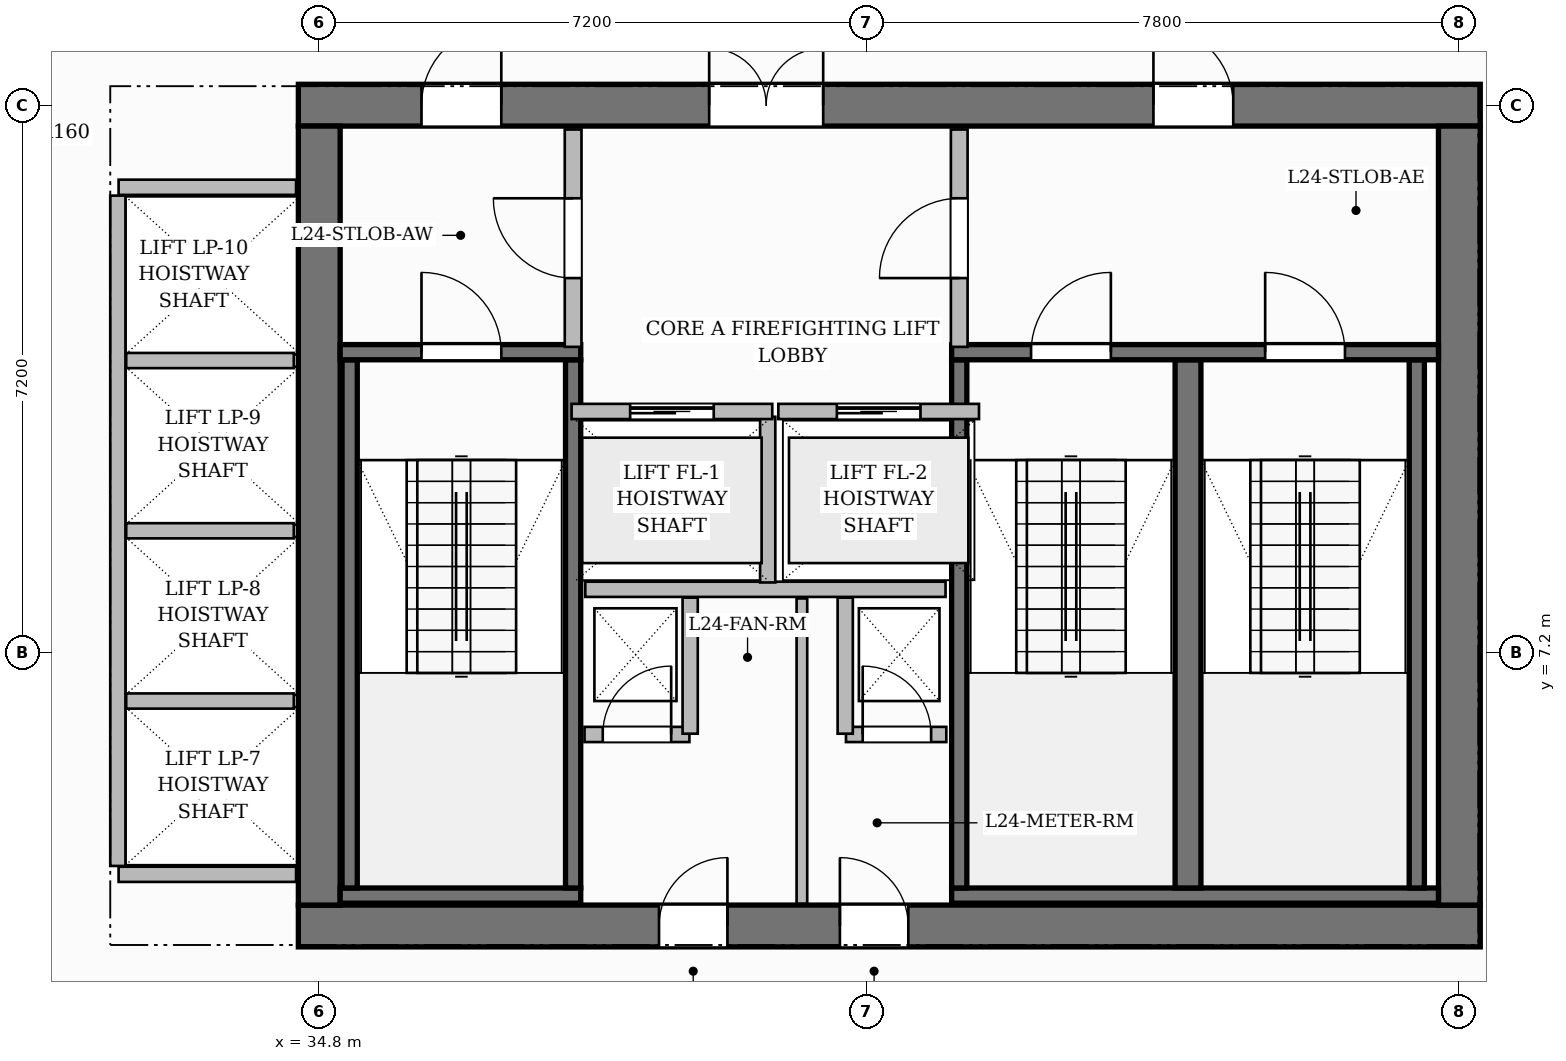
"""IFC4 building model, lengths in metres.
Left out: names, types, materials, properties, quantities, classifications, styles, units other than length and angle.
Written with IfcOpenShell. Run it as: python <this file> out.ifc"""

import sys

from ifc_helpers import new_model, si_unit, direction, frame, frame_2d, origin, place, context, subcontext, project, spatial, rectangle, extrude, source, transform, mapped, element, fill, save


model = new_model("IFC4")
c1 = context("Model", 3, precision=1e-05, world=origin(), true_north=direction((0.0, 1.0)))
c2 = subcontext(c1, "Body", "Model", "MODEL_VIEW")
j1 = project(units=[si_unit("LENGTHUNIT", "METRE"), si_unit("PLANEANGLEUNIT", "RADIAN")], contexts=[c1])
p1 = place(None, origin())
s1 = spatial("IfcSite", under=j1, at=p1, CompositionType="ELEMENT")
p2 = place(p1, origin())
s2 = spatial("IfcBuilding", under=s1, at=p2, CompositionType="ELEMENT")
p3 = place(p2, frame((0.0, 0.0, 99.0)))
s3 = spatial("IfcBuildingStorey", under=s2, at=p3, CompositionType="ELEMENT", Elevation=99.0)
p4 = place(p3, frame((34.525, 3.6, 0.0), z_axis=(0.0, 0.0, 1.0), x_axis=(1.0, 0.0, 0.0)))
e1 = element("IfcWall", 1, at=p4, inside=s3, PredefinedType="SHEAR", context=c2, shape_type="SweptSolid", body=[
    extrude(rectangle(XDim=15.55, YDim=0.55, at=frame_2d((7.775, 0.0))), origin(), (0.0, 0.0, 1.0), 3.7),
])
p5 = place(p4, frame((4.745, 0.0, 0.0)))
e2 = element("IfcOpeningElement", 2, at=p5, cuts=e1, PredefinedType="OPENING", context=c2, shape_type="SweptSolid", body=[
    extrude(rectangle(XDim=0.9, YDim=2.1, at=frame_2d((0.45, 1.05))), frame((0.0, 0.285, 0.0), z_axis=(0.0, -1.0, 0.0), x_axis=(1.0, 0.0, 0.0)), (0.0, 0.0, 1.0), 0.57),
])
p6 = place(p4, frame((7.125, 0.0, 0.0)))
e3 = element("IfcOpeningElement", 3, at=p6, cuts=e1, PredefinedType="OPENING", context=c2, shape_type="SweptSolid", body=[
    extrude(rectangle(XDim=0.9, YDim=2.1, at=frame_2d((0.45, 1.05))), frame((0.0, 0.285, 0.0), z_axis=(0.0, -1.0, 0.0), x_axis=(1.0, 0.0, 0.0)), (0.0, 0.0, 1.0), 0.57),
])
p7 = place(p3, frame((34.525, 14.4, 0.0), z_axis=(0.0, 0.0, 1.0), x_axis=(1.0, 0.0, 0.0)))
e4 = element("IfcWall", 4, at=p7, inside=s3, PredefinedType="SHEAR", context=c2, shape_type="SweptSolid", body=[
    extrude(rectangle(XDim=15.55, YDim=0.55, at=frame_2d((7.775, 0.0))), origin(), (0.0, 0.0, 1.0), 3.7),
])
p8 = place(p7, frame((5.405, 0.0, 0.0)))
e5 = element("IfcOpeningElement", 5, at=p8, cuts=e4, PredefinedType="OPENING", context=c2, shape_type="SweptSolid", body=[
    extrude(rectangle(XDim=1.5, YDim=2.2, at=frame_2d((0.75, 1.1))), frame((0.0, 0.285, 0.0), z_axis=(0.0, -1.0, 0.0), x_axis=(1.0, 0.0, 0.0)), (0.0, 0.0, 1.0), 0.57),
])
p9 = place(p7, frame((1.62, 0.0, 0.0)))
e6 = element("IfcOpeningElement", 6, at=p9, cuts=e4, PredefinedType="OPENING", context=c2, shape_type="SweptSolid", body=[
    extrude(rectangle(XDim=1.05, YDim=2.15, at=frame_2d((0.525, 1.075))), frame((0.0, 0.285, 0.0), z_axis=(0.0, -1.0, 0.0), x_axis=(1.0, 0.0, 0.0)), (0.0, 0.0, 1.0), 0.57),
])
p10 = place(p7, frame((11.25, 0.0, 0.0)))
e7 = element("IfcOpeningElement", 7, at=p10, cuts=e4, PredefinedType="OPENING", context=c2, shape_type="SweptSolid", body=[
    extrude(rectangle(XDim=1.05, YDim=2.15, at=frame_2d((0.525, 1.075))), frame((0.0, 0.285, 0.0), z_axis=(0.0, -1.0, 0.0), x_axis=(1.0, 0.0, 0.0)), (0.0, 0.0, 1.0), 0.57),
])
for number, where, z_axis, x_axis in (
    (8, (34.8, 3.875, 0.0), (0.0, 0.0, 1.0), (0.0, 1.0, 0.0)),
    (9, (49.8, 3.875, 0.0), (0.0, 0.0, 1.0), (0.0, 1.0, 0.0)),
):
    element("IfcWall", number, at=place(p3, frame(where, z_axis=z_axis, x_axis=x_axis)), inside=s3, PredefinedType="SHEAR", context=c2, shape_type="SweptSolid", body=[
        extrude(rectangle(XDim=10.25, YDim=0.55, at=frame_2d((5.125, 0.0))), origin(), (0.0, 0.0, 1.0), 3.7),
    ])
p11 = place(p3, frame((35.075, 4.0, 0.0), z_axis=(0.0, 0.0, 1.0), x_axis=(1.0, 0.0, 0.0)))
e10 = element("IfcWall", 10, at=p11, inside=s3, PredefinedType="SHEAR", context=c2, shape_type="SweptSolid", body=[
    extrude(rectangle(XDim=3.165, YDim=0.2, at=frame_2d((1.583, 0.0))), origin(), (0.0, 0.0, 1.0), 3.7),
])
for number, where, z_axis, x_axis in (
    (11, (35.2, 4.1, 0.0), (0.0, 0.0, 1.0), (0.0, 1.0, 0.0)),
    (12, (38.14, 4.1, 0.0), (0.0, 0.0, 1.0), (0.0, 1.0, 0.0)),
):
    element("IfcWall", number, at=place(p3, frame(where, z_axis=z_axis, x_axis=x_axis)), inside=s3, PredefinedType="SHEAR", context=c2, shape_type="SweptSolid", body=[
        extrude(rectangle(XDim=6.95, YDim=0.2, at=frame_2d((3.475, 0.0))), origin(), (0.0, 0.0, 1.0), 3.7),
    ])
p12 = place(p3, frame((35.075, 11.15, 0.0), z_axis=(0.0, 0.0, 1.0), x_axis=(1.0, 0.0, 0.0)))
e13 = element("IfcWall", 13, at=p12, inside=s3, PredefinedType="SHEAR", context=c2, shape_type="SweptSolid", body=[
    extrude(rectangle(XDim=3.165, YDim=0.2, at=frame_2d((1.583, 0.0))), origin(), (0.0, 0.0, 1.0), 3.7),
])
p13 = place(p12, frame((1.07, 0.0, 0.0)))
e14 = element("IfcOpeningElement", 14, at=p13, cuts=e13, PredefinedType="OPENING", context=c2, shape_type="SweptSolid", body=[
    extrude(rectangle(XDim=1.05, YDim=2.2, at=frame_2d((0.525, 1.1))), frame((0.0, 0.11, 0.0), z_axis=(0.0, -1.0, 0.0), x_axis=(1.0, 0.0, 0.0)), (0.0, 0.0, 1.0), 0.22),
])
p14 = place(p3, frame((43.12, 4.0, 0.0), z_axis=(0.0, 0.0, 1.0), x_axis=(1.0, 0.0, 0.0)))
e15 = element("IfcWall", 15, at=p14, inside=s3, PredefinedType="SHEAR", context=c2, shape_type="SweptSolid", body=[
    extrude(rectangle(XDim=6.405, YDim=0.2, at=frame_2d((3.202, 0.0))), origin(), (0.0, 0.0, 1.0), 3.7),
])
p15 = place(p3, frame((43.22, 4.1, 0.0), z_axis=(0.0, 0.0, 1.0), x_axis=(0.0, 1.0, 0.0)))
e16 = element("IfcWall", 16, at=p15, inside=s3, PredefinedType="SHEAR", context=c2, shape_type="SweptSolid", body=[
    extrude(rectangle(XDim=6.95, YDim=0.2, at=frame_2d((3.475, 0.0))), origin(), (0.0, 0.0, 1.0), 3.7),
])
p16 = place(p3, frame((46.23, 4.1, 0.0), z_axis=(0.0, 0.0, 1.0), x_axis=(0.0, 1.0, 0.0)))
e17 = element("IfcWall", 17, at=p16, inside=s3, PredefinedType="SHEAR", context=c2, shape_type="SweptSolid", body=[
    extrude(rectangle(XDim=6.95, YDim=0.34, at=frame_2d((3.475, 0.0))), origin(), (0.0, 0.0, 1.0), 3.7),
])
p17 = place(p3, frame((49.24, 4.1, 0.0), z_axis=(0.0, 0.0, 1.0), x_axis=(0.0, 1.0, 0.0)))
e18 = element("IfcWall", 18, at=p17, inside=s3, PredefinedType="SHEAR", context=c2, shape_type="SweptSolid", body=[
    extrude(rectangle(XDim=6.95, YDim=0.2, at=frame_2d((3.475, 0.0))), origin(), (0.0, 0.0, 1.0), 3.7),
])
p18 = place(p3, frame((43.12, 11.15, 0.0), z_axis=(0.0, 0.0, 1.0), x_axis=(1.0, 0.0, 0.0)))
e19 = element("IfcWall", 19, at=p18, inside=s3, PredefinedType="SHEAR", context=c2, shape_type="SweptSolid", body=[
    extrude(rectangle(XDim=6.405, YDim=0.2, at=frame_2d((3.202, 0.0))), origin(), (0.0, 0.0, 1.0), 3.7),
])
p19 = place(p18, frame((1.045, 0.0, 0.0)))
e20 = element("IfcOpeningElement", 20, at=p19, cuts=e19, PredefinedType="OPENING", context=c2, shape_type="SweptSolid", body=[
    extrude(rectangle(XDim=1.05, YDim=2.2, at=frame_2d((0.525, 1.1))), frame((0.0, 0.11, 0.0), z_axis=(0.0, -1.0, 0.0), x_axis=(1.0, 0.0, 0.0)), (0.0, 0.0, 1.0), 0.22),
])
p20 = place(p18, frame((4.125, 0.0, 0.0)))
e21 = element("IfcOpeningElement", 21, at=p20, cuts=e19, PredefinedType="OPENING", context=c2, shape_type="SweptSolid", body=[
    extrude(rectangle(XDim=1.05, YDim=2.2, at=frame_2d((0.525, 1.1))), frame((0.0, 0.11, 0.0), z_axis=(0.0, -1.0, 0.0), x_axis=(1.0, 0.0, 0.0)), (0.0, 0.0, 1.0), 0.22),
])
p21 = place(p3, frame((38.3, 8.03, 0.0), z_axis=(0.0, 0.0, 1.0), x_axis=(1.0, 0.0, 0.0)))
e22 = element("IfcWall", 22, at=p21, inside=s3, PredefinedType="PARTITIONING", context=c2, shape_type="SweptSolid", body=[
    extrude(rectangle(XDim=4.74, YDim=0.2, at=frame_2d((2.37, 0.0))), origin(), (0.0, 0.0, 1.0), 3.45),
])
p22 = place(p3, frame((40.7, 8.12, 0.0), z_axis=(0.0, 0.0, 1.0), x_axis=(0.0, 1.0, 0.0)))
e23 = element("IfcWall", 23, at=p22, inside=s3, PredefinedType="PARTITIONING", context=c2, shape_type="SweptSolid", body=[
    extrude(rectangle(XDim=2.18, YDim=0.2, at=frame_2d((1.09, 0.0))), origin(), (0.0, 0.0, 1.0), 3.45),
])
p23 = place(p3, frame((38.14, 11.22, 0.0), z_axis=(0.0, 0.0, 1.0), x_axis=(0.0, 1.0, 0.0)))
e24 = element("IfcWall", 24, at=p23, inside=s3, PredefinedType="PARTITIONING", context=c2, shape_type="SweptSolid", body=[
    extrude(rectangle(XDim=2.86, YDim=0.22, at=frame_2d((1.43, 0.0))), origin(), (0.0, 0.0, 1.0), 3.45),
])
p24 = place(p23, frame((0.905, 0.0, 0.0)))
e25 = element("IfcOpeningElement", 25, at=p24, cuts=e24, PredefinedType="OPENING", context=c2, shape_type="SweptSolid", body=[
    extrude(rectangle(XDim=1.05, YDim=2.15, at=frame_2d((0.525, 1.075))), frame((0.0, 0.12, 0.0), z_axis=(0.0, -1.0, 0.0), x_axis=(1.0, 0.0, 0.0)), (0.0, 0.0, 1.0), 0.24),
])
p25 = place(p3, frame((43.22, 11.22, 0.0), z_axis=(0.0, 0.0, 1.0), x_axis=(0.0, 1.0, 0.0)))
e26 = element("IfcWall", 26, at=p25, inside=s3, PredefinedType="PARTITIONING", context=c2, shape_type="SweptSolid", body=[
    extrude(rectangle(XDim=2.86, YDim=0.22, at=frame_2d((1.43, 0.0))), origin(), (0.0, 0.0, 1.0), 3.45),
])
p26 = place(p25, frame((0.905, 0.0, 0.0)))
e27 = element("IfcOpeningElement", 27, at=p26, cuts=e26, PredefinedType="OPENING", context=c2, shape_type="SweptSolid", body=[
    extrude(rectangle(XDim=1.05, YDim=2.15, at=frame_2d((0.525, 1.075))), frame((0.0, 0.12, 0.0), z_axis=(0.0, -1.0, 0.0), x_axis=(1.0, 0.0, 0.0)), (0.0, 0.0, 1.0), 0.24),
])
p27 = place(p3, frame((38.29, 6.12, 0.0), z_axis=(0.0, 0.0, 1.0), x_axis=(1.0, 0.0, 0.0)))
e28 = element("IfcWall", 28, at=p27, inside=s3, PredefinedType="PARTITIONING", context=c2, shape_type="SweptSolid", body=[
    extrude(rectangle(XDim=1.38, YDim=0.2, at=frame_2d((0.69, 0.0))), origin(), (0.0, 0.0, 1.0), 3.45),
])
p28 = place(p27, frame((0.24, 0.0, 0.0)))
e29 = element("IfcOpeningElement", 29, at=p28, cuts=e28, PredefinedType="OPENING", context=c2, shape_type="SweptSolid", body=[
    extrude(rectangle(XDim=0.9, YDim=2.1, at=frame_2d((0.45, 1.05))), frame((0.0, 0.11, 0.0), z_axis=(0.0, -1.0, 0.0), x_axis=(1.0, 0.0, 0.0)), (0.0, 0.0, 1.0), 0.22),
])
p29 = place(p3, frame((39.68, 6.13, 0.0), z_axis=(0.0, 0.0, 1.0), x_axis=(0.0, 1.0, 0.0)))
e30 = element("IfcWall", 30, at=p29, inside=s3, PredefinedType="PARTITIONING", context=c2, shape_type="SweptSolid", body=[
    extrude(rectangle(XDim=1.79, YDim=0.2, at=frame_2d((0.895, 0.0))), origin(), (0.0, 0.0, 1.0), 3.45),
])
p30 = place(p3, frame((41.73, 6.12, 0.0), z_axis=(0.0, 0.0, 1.0), x_axis=(1.0, 0.0, 0.0)))
e31 = element("IfcWall", 31, at=p30, inside=s3, PredefinedType="PARTITIONING", context=c2, shape_type="SweptSolid", body=[
    extrude(rectangle(XDim=1.32, YDim=0.2, at=frame_2d((0.66, 0.0))), origin(), (0.0, 0.0, 1.0), 3.45),
])
p31 = place(p30, frame((0.22, 0.0, 0.0)))
e32 = element("IfcOpeningElement", 32, at=p31, cuts=e31, PredefinedType="OPENING", context=c2, shape_type="SweptSolid", body=[
    extrude(rectangle(XDim=0.9, YDim=2.1, at=frame_2d((0.45, 1.05))), frame((0.0, 0.11, 0.0), z_axis=(0.0, -1.0, 0.0), x_axis=(1.0, 0.0, 0.0)), (0.0, 0.0, 1.0), 0.22),
])
p32 = place(p3, frame((41.72, 6.13, 0.0), z_axis=(0.0, 0.0, 1.0), x_axis=(0.0, 1.0, 0.0)))
e33 = element("IfcWall", 33, at=p32, inside=s3, PredefinedType="PARTITIONING", context=c2, shape_type="SweptSolid", body=[
    extrude(rectangle(XDim=1.79, YDim=0.2, at=frame_2d((0.895, 0.0))), origin(), (0.0, 0.0, 1.0), 3.45),
])
p33 = place(p3, frame((41.15, 3.895, 0.0), z_axis=(0.0, 0.0, 1.0), x_axis=(0.0, 1.0, 0.0)))
e34 = element("IfcWall", 34, at=p33, inside=s3, PredefinedType="PARTITIONING", context=c2, shape_type="SweptSolid", body=[
    extrude(rectangle(XDim=4.015, YDim=0.14, at=frame_2d((2.007, 0.0))), origin(), (0.0, 0.0, 1.0), 3.45),
])
for number, where, z_axis, x_axis in (
    (35, (32.16, 4.28, 0.0), (0.0, 0.0, 1.0), (1.0, 0.0, 0.0)),
    (36, (32.16, 13.32, 0.0), (0.0, 0.0, 1.0), (1.0, 0.0, 0.0)),
):
    element("IfcWall", number, at=place(p3, frame(where, z_axis=z_axis, x_axis=x_axis)), inside=s3, PredefinedType="PARTITIONING", context=c2, shape_type="SweptSolid", body=[
        extrude(rectangle(XDim=2.335, YDim=0.2, at=frame_2d((1.167, 0.0))), origin(), (0.0, 0.0, 1.0), 3.45),
    ])
p34 = place(p3, frame((32.15, 4.39, 0.0), z_axis=(0.0, 0.0, 1.0), x_axis=(0.0, 1.0, 0.0)))
e37 = element("IfcWall", 37, at=p34, inside=s3, PredefinedType="PARTITIONING", context=c2, shape_type="SweptSolid", body=[
    extrude(rectangle(XDim=8.82, YDim=0.2, at=frame_2d((4.41, 0.0))), origin(), (0.0, 0.0, 1.0), 3.45),
])
for number, where, z_axis, x_axis in (
    (38, (32.26, 6.56, 0.0), (0.0, 0.0, 1.0), (1.0, 0.0, 0.0)),
    (39, (32.26, 8.8, 0.0), (0.0, 0.0, 1.0), (1.0, 0.0, 0.0)),
    (40, (32.26, 11.04, 0.0), (0.0, 0.0, 1.0), (1.0, 0.0, 0.0)),
):
    element("IfcWall", number, at=place(p3, frame(where, z_axis=z_axis, x_axis=x_axis)), inside=s3, PredefinedType="PARTITIONING", context=c2, shape_type="SweptSolid", body=[
        extrude(rectangle(XDim=2.205, YDim=0.2, at=frame_2d((1.103, 0.0))), origin(), (0.0, 0.0, 1.0), 3.45),
    ])
p35 = place(p3, frame((38.12, 10.37, 0.0), z_axis=(0.0, 0.0, 1.0), x_axis=(1.0, 0.0, 0.0)))
e41 = element("IfcWall", 41, at=p35, inside=s3, PredefinedType="PARTITIONING", context=c2, shape_type="SweptSolid", body=[
    extrude(rectangle(XDim=2.64, YDim=0.2, at=frame_2d((1.32, 0.0))), origin(), (0.0, 0.0, 1.0), 3.45),
])
p36 = place(p35, frame((0.77, 0.0, 0.0)))
e42 = element("IfcOpeningElement", 42, at=p36, cuts=e41, PredefinedType="OPENING", context=c2, shape_type="SweptSolid", body=[
    extrude(rectangle(XDim=1.1, YDim=2.2, at=frame_2d((0.55, 1.1))), frame((0.0, 0.11, 0.0), z_axis=(0.0, -1.0, 0.0), x_axis=(1.0, 0.0, 0.0)), (0.0, 0.0, 1.0), 0.22),
])
p37 = place(p3, frame((40.84, 10.37, 0.0), z_axis=(0.0, 0.0, 1.0), x_axis=(1.0, 0.0, 0.0)))
e43 = element("IfcWall", 43, at=p37, inside=s3, PredefinedType="PARTITIONING", context=c2, shape_type="SweptSolid", body=[
    extrude(rectangle(XDim=2.64, YDim=0.2, at=frame_2d((1.32, 0.0))), origin(), (0.0, 0.0, 1.0), 3.45),
])
p38 = place(p37, frame((0.77, 0.0, 0.0)))
e44 = element("IfcOpeningElement", 44, at=p38, cuts=e43, PredefinedType="OPENING", context=c2, shape_type="SweptSolid", body=[
    extrude(rectangle(XDim=1.1, YDim=2.2, at=frame_2d((0.55, 1.1))), frame((0.0, 0.11, 0.0), z_axis=(0.0, -1.0, 0.0), x_axis=(1.0, 0.0, 0.0)), (0.0, 0.0, 1.0), 0.22),
])
m1 = source(origin(), c2, "Body", "SweptSolid", [
    extrude(rectangle(XDim=1.05, YDim=2.2, at=frame_2d((0.525, 1.1))), frame((0.0, 0.025, 0.0), z_axis=(0.0, -1.0, 0.0), x_axis=(1.0, 0.0, 0.0)), (0.0, 0.0, 1.0), 0.05),
])
p39 = place(p13, origin())
e45 = element("IfcDoor", 45, at=p39, inside=s3, OperationType="SINGLE_SWING_LEFT", PredefinedType="DOOR", context=c2, shape_type="MappedRepresentation", body=[
    mapped(m1, transform((0.0, 0.0, 0.0), scale=1.0)),
])
fill(e14, e45)
p40 = place(p19, origin())
e46 = element("IfcDoor", 46, at=p40, inside=s3, OperationType="SINGLE_SWING_RIGHT", PredefinedType="DOOR", context=c2, shape_type="MappedRepresentation", body=[
    mapped(m1, transform((0.0, 0.0, 0.0), scale=1.0)),
])
fill(e20, e46)
p41 = place(p20, origin())
e47 = element("IfcDoor", 47, at=p41, inside=s3, OperationType="SINGLE_SWING_LEFT", PredefinedType="DOOR", context=c2, shape_type="MappedRepresentation", body=[
    mapped(m1, transform((0.0, 0.0, 0.0), scale=1.0)),
])
fill(e21, e47)
m2 = source(origin(), c2, "Body", "SweptSolid", [
    extrude(rectangle(XDim=1.05, YDim=2.15, at=frame_2d((0.525, 1.075))), frame((0.0, 0.025, 0.0), z_axis=(0.0, -1.0, 0.0), x_axis=(1.0, 0.0, 0.0)), (0.0, 0.0, 1.0), 0.05),
])
p42 = place(p24, origin())
e48 = element("IfcDoor", 48, at=p42, inside=s3, OperationType="SINGLE_SWING_RIGHT", PredefinedType="DOOR", context=c2, shape_type="MappedRepresentation", body=[
    mapped(m2, transform((0.0, 0.0, 0.0), scale=1.0)),
])
fill(e25, e48)
p43 = place(p26, origin())
e49 = element("IfcDoor", 49, at=p43, inside=s3, OperationType="SINGLE_SWING_LEFT", PredefinedType="DOOR", context=c2, shape_type="MappedRepresentation", body=[
    mapped(m2, transform((0.0, 0.0, 0.0), scale=1.0)),
])
fill(e27, e49)
m3 = source(origin(), c2, "Body", "SweptSolid", [
    extrude(rectangle(XDim=1.5, YDim=2.2, at=frame_2d((0.75, 1.1))), frame((0.0, 0.025, 0.0), z_axis=(0.0, -1.0, 0.0), x_axis=(1.0, 0.0, 0.0)), (0.0, 0.0, 1.0), 0.05),
])
p44 = place(p8, origin())
e50 = element("IfcDoor", 50, at=p44, inside=s3, OperationType="DOUBLE_DOOR_SINGLE_SWING", PredefinedType="DOOR", context=c2, shape_type="MappedRepresentation", body=[
    mapped(m3, transform((0.0, 0.0, 0.0), scale=1.0)),
])
fill(e5, e50)
p45 = place(p9, origin())
e51 = element("IfcDoor", 51, at=p45, inside=s3, OperationType="SINGLE_SWING_RIGHT", PredefinedType="DOOR", context=c2, shape_type="MappedRepresentation", body=[
    mapped(m2, transform((0.0, 0.0, 0.0), scale=1.0)),
])
fill(e6, e51)
p46 = place(p10, origin())
e52 = element("IfcDoor", 52, at=p46, inside=s3, OperationType="SINGLE_SWING_LEFT", PredefinedType="DOOR", context=c2, shape_type="MappedRepresentation", body=[
    mapped(m2, transform((0.0, 0.0, 0.0), scale=1.0)),
])
fill(e7, e52)
m4 = source(origin(), c2, "Body", "SweptSolid", [
    extrude(rectangle(XDim=0.9, YDim=2.1, at=frame_2d((0.45, 1.05))), frame((0.0, 0.025, 0.0), z_axis=(0.0, -1.0, 0.0), x_axis=(1.0, 0.0, 0.0)), (0.0, 0.0, 1.0), 0.05),
])
p47 = place(p28, origin())
e53 = element("IfcDoor", 53, at=p47, inside=s3, OperationType="SINGLE_SWING_RIGHT", PredefinedType="DOOR", context=c2, shape_type="MappedRepresentation", body=[
    mapped(m4, transform((0.0, 0.0, 0.0), scale=1.0)),
])
fill(e29, e53)
p48 = place(p31, origin())
e54 = element("IfcDoor", 54, at=p48, inside=s3, OperationType="SINGLE_SWING_LEFT", PredefinedType="DOOR", context=c2, shape_type="MappedRepresentation", body=[
    mapped(m4, transform((0.0, 0.0, 0.0), scale=1.0)),
])
fill(e32, e54)
p49 = place(p5, origin())
e55 = element("IfcDoor", 55, at=p49, inside=s3, OperationType="SINGLE_SWING_RIGHT", PredefinedType="DOOR", context=c2, shape_type="MappedRepresentation", body=[
    mapped(m4, transform((0.0, 0.0, 0.0), scale=1.0)),
])
fill(e2, e55)
p50 = place(p6, origin())
e56 = element("IfcDoor", 56, at=p50, inside=s3, OperationType="SINGLE_SWING_LEFT", PredefinedType="DOOR", context=c2, shape_type="MappedRepresentation", body=[
    mapped(m4, transform((0.0, 0.0, 0.0), scale=1.0)),
])
fill(e3, e56)
m5 = source(origin(), c2, "Body", "SweptSolid", [
    extrude(rectangle(XDim=1.1, YDim=2.2, at=frame_2d((0.55, 1.1))), frame((0.0, 0.025, 0.0), z_axis=(0.0, -1.0, 0.0), x_axis=(1.0, 0.0, 0.0)), (0.0, 0.0, 1.0), 0.05),
])
p51 = place(p36, origin())
e57 = element("IfcDoor", 57, at=p51, inside=s3, OperationType="SLIDING_TO_LEFT", PredefinedType="DOOR", context=c2, shape_type="MappedRepresentation", body=[
    mapped(m5, transform((0.0, 0.0, 0.0), scale=1.0)),
])
fill(e42, e57)
p52 = place(p38, origin())
e58 = element("IfcDoor", 58, at=p52, inside=s3, OperationType="SLIDING_TO_LEFT", PredefinedType="DOOR", context=c2, shape_type="MappedRepresentation", body=[
    mapped(m5, transform((0.0, 0.0, 0.0), scale=1.0)),
])
fill(e44, e58)
save(model, sys.argv[1])
